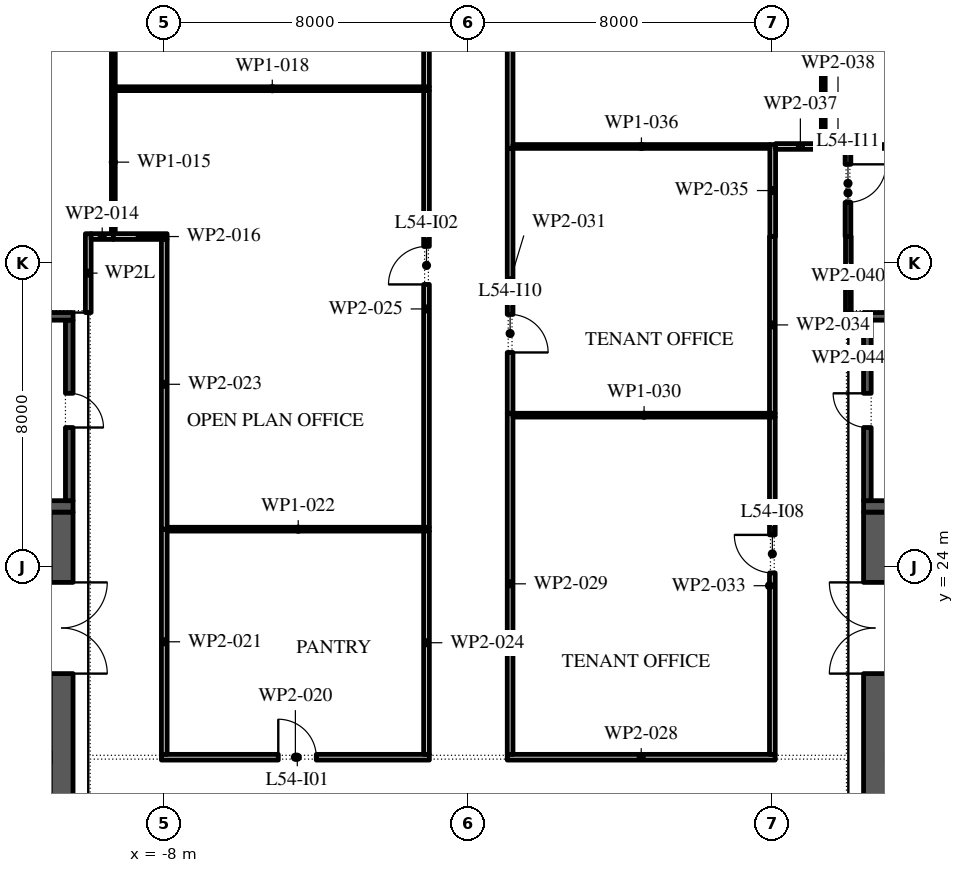
"""IFC4 building model, lengths in metres.
Left out: names, types, materials, properties, quantities, classifications, styles, units other than length and angle.
Written with IfcOpenShell. Run it as: python <this file> out.ifc"""

import sys

from ifc_helpers import new_model, si_unit, direction, frame, frame_2d, origin, place, context, subcontext, project, spatial, rectangle, extrude, element, fill, save


model = new_model("IFC4")
c1 = context("Model", 3, precision=1e-05, world=origin(), true_north=direction((0.0, 1.0)))
c2 = subcontext(c1, "Body", "Model", "MODEL_VIEW")
j1 = project(units=[si_unit("LENGTHUNIT", "METRE"), si_unit("PLANEANGLEUNIT", "RADIAN")], contexts=[c1])
p1 = place(None, origin())
s1 = spatial("IfcSite", under=j1, at=p1, CompositionType="ELEMENT")
p2 = place(p1, origin())
s2 = spatial("IfcBuilding", under=s1, at=p2, CompositionType="ELEMENT")
p3 = place(p2, frame((0.0, 0.0, 251.4)))
s3 = spatial("IfcBuildingStorey", under=s2, at=p3, CompositionType="ELEMENT", Elevation=251.4)
p4 = place(p3, frame((-10.7, -2.45, 0.0), z_axis=(0.0, 0.0, 1.0), x_axis=(0.0, 1.0, 0.0)))
e1 = element("IfcWall", 1, at=p4, inside=s3, PredefinedType="SHEAR", context=c2, shape_type="SweptSolid", body=[
    extrude(rectangle(XDim=27.9, YDim=0.6, at=frame_2d((13.95, 0.0))), origin(), (0.0, 0.0, 1.0), 4.0),
])
p5 = place(p4, frame((23.65, 0.0, 0.0)))
e2 = element("IfcOpeningElement", 2, at=p5, cuts=e1, PredefinedType="OPENING", context=c2, shape_type="SweptSolid", body=[
    extrude(rectangle(XDim=2.4, YDim=2.1, at=frame_2d((1.2, 1.05))), frame((0.0, 0.31, 0.0), z_axis=(0.0, -1.0, 0.0), x_axis=(1.0, 0.0, 0.0)), (0.0, 0.0, 1.0), 0.62),
])
p6 = place(p4, frame((1.387, 0.0, 0.0)))
e3 = element("IfcOpeningElement", 3, at=p6, cuts=e1, PredefinedType="OPENING", context=c2, shape_type="SweptSolid", body=[
    extrude(rectangle(XDim=0.9, YDim=2.1, at=frame_2d((0.45, 1.05))), frame((0.0, 0.31, 0.0), z_axis=(0.0, -1.0, 0.0), x_axis=(1.0, 0.0, 0.0)), (0.0, 0.0, 1.0), 0.62),
])
p7 = place(p4, frame((4.562, 0.0, 0.0)))
e4 = element("IfcOpeningElement", 4, at=p7, cuts=e1, PredefinedType="OPENING", context=c2, shape_type="SweptSolid", body=[
    extrude(rectangle(XDim=1.0, YDim=2.1, at=frame_2d((0.5, 1.05))), frame((0.0, 0.31, 0.0), z_axis=(0.0, -1.0, 0.0), x_axis=(1.0, 0.0, 0.0)), (0.0, 0.0, 1.0), 0.62),
])
p8 = place(p3, frame((-21.6, 25.6, 0.0), z_axis=(0.0, 0.0, 1.0), x_axis=(1.0, 0.0, 0.0)))
e5 = element("IfcWall", 5, at=p8, inside=s3, PredefinedType="SHEAR", context=c2, shape_type="SweptSolid", body=[
    extrude(rectangle(XDim=11.2, YDim=0.3, at=frame_2d((5.6, 0.0))), origin(), (0.0, 0.0, 1.0), 4.0),
])
p9 = place(p3, frame((-10.5, 25.75, 0.0), z_axis=(0.0, 0.0, 1.0), x_axis=(0.0, 1.0, 0.0)))
e6 = element("IfcWall", 6, at=p9, inside=s3, PredefinedType="SHEAR", context=c2, shape_type="SweptSolid", body=[
    extrude(rectangle(XDim=4.75, YDim=0.2, at=frame_2d((2.375, 0.0))), origin(), (0.0, 0.0, 1.0), 4.0),
])
p10 = place(p9, frame((1.925, 0.0, 0.0)))
e7 = element("IfcOpeningElement", 7, at=p10, cuts=e6, PredefinedType="OPENING", context=c2, shape_type="SweptSolid", body=[
    extrude(rectangle(XDim=0.9, YDim=2.1, at=frame_2d((0.45, 1.05))), frame((0.0, 0.11, 0.0), z_axis=(0.0, -1.0, 0.0), x_axis=(1.0, 0.0, 0.0)), (0.0, 0.0, 1.0), 0.22),
])
p11 = place(p3, frame((-21.6, 30.6, 0.0), z_axis=(0.0, 0.0, 1.0), x_axis=(1.0, 0.0, 0.0)))
e8 = element("IfcWall", 8, at=p11, inside=s3, PredefinedType="SHEAR", context=c2, shape_type="SweptSolid", body=[
    extrude(rectangle(XDim=11.2, YDim=0.2, at=frame_2d((5.6, 0.0))), origin(), (0.0, 0.0, 1.0), 4.0),
])
p12 = place(p3, frame((10.7, -2.45, 0.0), z_axis=(0.0, 0.0, 1.0), x_axis=(0.0, 1.0, 0.0)))
e9 = element("IfcWall", 9, at=p12, inside=s3, PredefinedType="SHEAR", context=c2, shape_type="SweptSolid", body=[
    extrude(rectangle(XDim=27.9, YDim=0.6, at=frame_2d((13.95, 0.0))), origin(), (0.0, 0.0, 1.0), 4.0),
])
p13 = place(p12, frame((23.65, 0.0, 0.0)))
e10 = element("IfcOpeningElement", 10, at=p13, cuts=e9, PredefinedType="OPENING", context=c2, shape_type="SweptSolid", body=[
    extrude(rectangle(XDim=2.4, YDim=2.1, at=frame_2d((1.2, 1.05))), frame((0.0, 0.31, 0.0), z_axis=(0.0, -1.0, 0.0), x_axis=(1.0, 0.0, 0.0)), (0.0, 0.0, 1.0), 0.62),
])
p14 = place(p12, frame((0.788, 0.0, 0.0)))
e11 = element("IfcOpeningElement", 11, at=p14, cuts=e9, PredefinedType="OPENING", context=c2, shape_type="SweptSolid", body=[
    extrude(rectangle(XDim=0.9, YDim=2.1, at=frame_2d((0.45, 1.05))), frame((0.0, 0.31, 0.0), z_axis=(0.0, -1.0, 0.0), x_axis=(1.0, 0.0, 0.0)), (0.0, 0.0, 1.0), 0.62),
])
p15 = place(p12, frame((3.962, 0.0, 0.0)))
e12 = element("IfcOpeningElement", 12, at=p15, cuts=e9, PredefinedType="OPENING", context=c2, shape_type="SweptSolid", body=[
    extrude(rectangle(XDim=1.0, YDim=2.1, at=frame_2d((0.5, 1.05))), frame((0.0, 0.31, 0.0), z_axis=(0.0, -1.0, 0.0), x_axis=(1.0, 0.0, 0.0)), (0.0, 0.0, 1.0), 0.62),
])
p16 = place(p3, frame((10.4, 25.6, 0.0), z_axis=(0.0, 0.0, 1.0), x_axis=(1.0, 0.0, 0.0)))
e13 = element("IfcWall", 13, at=p16, inside=s3, PredefinedType="SHEAR", context=c2, shape_type="SweptSolid", body=[
    extrude(rectangle(XDim=11.2, YDim=0.3, at=frame_2d((5.6, 0.0))), origin(), (0.0, 0.0, 1.0), 4.0),
])
p17 = place(p3, frame((10.5, 25.75, 0.0), z_axis=(0.0, 0.0, 1.0), x_axis=(0.0, 1.0, 0.0)))
e14 = element("IfcWall", 14, at=p17, inside=s3, PredefinedType="SHEAR", context=c2, shape_type="SweptSolid", body=[
    extrude(rectangle(XDim=4.75, YDim=0.2, at=frame_2d((2.375, 0.0))), origin(), (0.0, 0.0, 1.0), 4.0),
])
p18 = place(p17, frame((1.925, 0.0, 0.0)))
e15 = element("IfcOpeningElement", 15, at=p18, cuts=e14, PredefinedType="OPENING", context=c2, shape_type="SweptSolid", body=[
    extrude(rectangle(XDim=0.9, YDim=2.1, at=frame_2d((0.45, 1.05))), frame((0.0, 0.11, 0.0), z_axis=(0.0, -1.0, 0.0), x_axis=(1.0, 0.0, 0.0)), (0.0, 0.0, 1.0), 0.22),
])
p19 = place(p3, frame((10.4, 30.6, 0.0), z_axis=(0.0, 0.0, 1.0), x_axis=(1.0, 0.0, 0.0)))
e16 = element("IfcWall", 16, at=p19, inside=s3, PredefinedType="SHEAR", context=c2, shape_type="SweptSolid", body=[
    extrude(rectangle(XDim=11.2, YDim=0.2, at=frame_2d((5.6, 0.0))), origin(), (0.0, 0.0, 1.0), 4.0),
])
p20 = place(p3, frame((-10.0, 30.7, 0.0), z_axis=(0.0, 0.0, 1.0), x_axis=(0.0, 1.0, 0.0)))
e17 = element("IfcWall", 17, at=p20, inside=s3, PredefinedType="PARTITIONING", context=c2, shape_type="SweptSolid", body=[
    extrude(rectangle(XDim=2.075, YDim=0.15, at=frame_2d((1.038, 0.0))), origin(), (0.0, 0.0, 1.0), 3.02),
])
p21 = place(p3, frame((-9.925, 32.7, 0.0), z_axis=(0.0, 0.0, 1.0), x_axis=(1.0, 0.0, 0.0)))
e18 = element("IfcWall", 18, at=p21, inside=s3, PredefinedType="PARTITIONING", context=c2, shape_type="SweptSolid", body=[
    extrude(rectangle(XDim=0.585, YDim=0.15, at=frame_2d((0.292, 0.0))), origin(), (0.0, 0.0, 1.0), 4.0),
])
p22 = place(p3, frame((-9.34, 32.775, 0.0), z_axis=(0.0, 0.0, 1.0), x_axis=(0.0, 1.0, 0.0)))
e19 = element("IfcWall", 19, at=p22, inside=s3, PredefinedType="PARTITIONING", context=c2, shape_type="SweptSolid", body=[
    extrude(rectangle(XDim=3.765, YDim=0.1, at=frame_2d((1.883, 0.0))), origin(), (0.0, 0.0, 1.0), 4.0),
])
p23 = place(p3, frame((-9.34, 32.7, 0.0), z_axis=(0.0, 0.0, 1.0), x_axis=(1.0, 0.0, 0.0)))
e20 = element("IfcWall", 20, at=p23, inside=s3, PredefinedType="PARTITIONING", context=c2, shape_type="SweptSolid", body=[
    extrude(rectangle(XDim=1.415, YDim=0.15, at=frame_2d((0.708, 0.0))), origin(), (0.0, 0.0, 1.0), 4.0),
])
p24 = place(p3, frame((-9.34, 36.54, 0.0), z_axis=(0.0, 0.0, 1.0), x_axis=(0.0, 1.0, 0.0)))
e21 = element("IfcWall", 21, at=p24, inside=s3, PredefinedType="PARTITIONING", context=c2, shape_type="SweptSolid", body=[
    extrude(rectangle(XDim=5.41, YDim=0.1, at=frame_2d((2.705, 0.0))), origin(), (0.0, 0.0, 1.0), 4.0),
])
p25 = place(p3, frame((-9.29, 36.59, 0.0), z_axis=(0.0, 0.0, 1.0), x_axis=(1.0, 0.0, 0.0)))
e22 = element("IfcWall", 22, at=p25, inside=s3, PredefinedType="PARTITIONING", context=c2, shape_type="SweptSolid", body=[
    extrude(rectangle(XDim=8.265, YDim=0.1, at=frame_2d((4.133, 0.0))), origin(), (0.0, 0.0, 1.0), 4.0),
])
p26 = place(p3, frame((-8.075, 19.0, 0.0), z_axis=(0.0, 0.0, 1.0), x_axis=(1.0, 0.0, 0.0)))
e23 = element("IfcWall", 23, at=p26, inside=s3, PredefinedType="PARTITIONING", context=c2, shape_type="SweptSolid", body=[
    extrude(rectangle(XDim=7.05, YDim=0.15, at=frame_2d((3.525, 0.0))), origin(), (0.0, 0.0, 1.0), 4.0),
])
p27 = place(p26, frame((3.075, 0.0, 0.0)))
e24 = element("IfcOpeningElement", 24, at=p27, cuts=e23, PredefinedType="OPENING", context=c2, shape_type="SweptSolid", body=[
    extrude(rectangle(XDim=1.0, YDim=2.1, at=frame_2d((0.5, 1.05))), frame((0.0, 0.085, 0.0), z_axis=(0.0, -1.0, 0.0), x_axis=(1.0, 0.0, 0.0)), (0.0, 0.0, 1.0), 0.17),
])
p28 = place(p3, frame((-8.0, 25.0, 0.0), z_axis=(0.0, 0.0, 1.0), x_axis=(0.0, -1.0, 0.0)))
e25 = element("IfcWall", 25, at=p28, inside=s3, PredefinedType="PARTITIONING", context=c2, shape_type="SweptSolid", body=[
    extrude(rectangle(XDim=5.925, YDim=0.15, at=frame_2d((2.962, 0.0))), origin(), (0.0, 0.0, 1.0), 4.0),
])
p29 = place(p3, frame((-7.925, 25.0, 0.0), z_axis=(0.0, 0.0, 1.0), x_axis=(1.0, 0.0, 0.0)))
e26 = element("IfcWall", 26, at=p29, inside=s3, PredefinedType="PARTITIONING", context=c2, shape_type="SweptSolid", body=[
    extrude(rectangle(XDim=6.9, YDim=0.1, at=frame_2d((3.45, 0.0))), origin(), (0.0, 0.0, 1.0), 4.0),
])
p30 = place(p3, frame((-8.0, 32.625, 0.0), z_axis=(0.0, 0.0, 1.0), x_axis=(0.0, -1.0, 0.0)))
e27 = element("IfcWall", 27, at=p30, inside=s3, PredefinedType="PARTITIONING", context=c2, shape_type="SweptSolid", body=[
    extrude(rectangle(XDim=7.625, YDim=0.15, at=frame_2d((3.812, 0.0))), origin(), (0.0, 0.0, 1.0), 4.0),
])
p31 = place(p3, frame((-1.1, 19.075, 0.0), z_axis=(0.0, 0.0, 1.0), x_axis=(0.0, 1.0, 0.0)))
e28 = element("IfcWall", 28, at=p31, inside=s3, PredefinedType="PARTITIONING", context=c2, shape_type="SweptSolid", body=[
    extrude(rectangle(XDim=5.875, YDim=0.15, at=frame_2d((2.938, 0.0))), origin(), (0.0, 0.0, 1.0), 4.0),
])
p32 = place(p3, frame((-1.1, 25.05, 0.0), z_axis=(0.0, 0.0, 1.0), x_axis=(0.0, 1.0, 0.0)))
e29 = element("IfcWall", 29, at=p32, inside=s3, PredefinedType="PARTITIONING", context=c2, shape_type="SweptSolid", body=[
    extrude(rectangle(XDim=11.49, YDim=0.15, at=frame_2d((5.745, 0.0))), origin(), (0.0, 0.0, 1.0), 4.0),
])
p33 = place(p32, frame((6.39, 0.0, 0.0)))
e30 = element("IfcOpeningElement", 30, at=p33, cuts=e29, PredefinedType="OPENING", context=c2, shape_type="SweptSolid", body=[
    extrude(rectangle(XDim=1.0, YDim=2.1, at=frame_2d((0.5, 1.05))), frame((0.0, 0.085, 0.0), z_axis=(0.0, -1.0, 0.0), x_axis=(1.0, 0.0, 0.0)), (0.0, 0.0, 1.0), 0.17),
])
p34 = place(p3, frame((-1.1, 36.64, 0.0), z_axis=(0.0, 0.0, 1.0), x_axis=(0.0, 1.0, 0.0)))
e31 = element("IfcWall", 31, at=p34, inside=s3, PredefinedType="PARTITIONING", context=c2, shape_type="SweptSolid", body=[
    extrude(rectangle(XDim=11.138, YDim=0.15, at=frame_2d((5.569, 0.0))), origin(), (0.0, 0.0, 1.0), 4.0),
])
p35 = place(p34, frame((6.21, 0.0, 0.0)))
e32 = element("IfcOpeningElement", 32, at=p35, cuts=e31, PredefinedType="OPENING", context=c2, shape_type="SweptSolid", body=[
    extrude(rectangle(XDim=1.0, YDim=2.1, at=frame_2d((0.5, 1.05))), frame((0.0, 0.085, 0.0), z_axis=(0.0, -1.0, 0.0), x_axis=(1.0, 0.0, 0.0)), (0.0, 0.0, 1.0), 0.17),
])
p36 = place(p3, frame((1.025, 19.0, 0.0), z_axis=(0.0, 0.0, 1.0), x_axis=(1.0, 0.0, 0.0)))
e33 = element("IfcWall", 33, at=p36, inside=s3, PredefinedType="PARTITIONING", context=c2, shape_type="SweptSolid", body=[
    extrude(rectangle(XDim=7.05, YDim=0.15, at=frame_2d((3.525, 0.0))), origin(), (0.0, 0.0, 1.0), 4.0),
])
p37 = place(p3, frame((1.1, 28.05, 0.0), z_axis=(0.0, 0.0, 1.0), x_axis=(0.0, -1.0, 0.0)))
e34 = element("IfcWall", 34, at=p37, inside=s3, PredefinedType="PARTITIONING", context=c2, shape_type="SweptSolid", body=[
    extrude(rectangle(XDim=8.975, YDim=0.15, at=frame_2d((4.488, 0.0))), origin(), (0.0, 0.0, 1.0), 4.0),
])
p38 = place(p3, frame((1.175, 28.0, 0.0), z_axis=(0.0, 0.0, 1.0), x_axis=(1.0, 0.0, 0.0)))
e35 = element("IfcWall", 35, at=p38, inside=s3, PredefinedType="PARTITIONING", context=c2, shape_type="SweptSolid", body=[
    extrude(rectangle(XDim=6.9, YDim=0.1, at=frame_2d((3.45, 0.0))), origin(), (0.0, 0.0, 1.0), 4.0),
])
p39 = place(p3, frame((1.1, 35.02, 0.0), z_axis=(0.0, 0.0, 1.0), x_axis=(0.0, -1.0, 0.0)))
e36 = element("IfcWall", 36, at=p39, inside=s3, PredefinedType="PARTITIONING", context=c2, shape_type="SweptSolid", body=[
    extrude(rectangle(XDim=6.97, YDim=0.15, at=frame_2d((3.485, 0.0))), origin(), (0.0, 0.0, 1.0), 4.0),
])
p40 = place(p39, frame((4.37, 0.0, 0.0)))
e37 = element("IfcOpeningElement", 37, at=p40, cuts=e36, PredefinedType="OPENING", context=c2, shape_type="SweptSolid", body=[
    extrude(rectangle(XDim=1.0, YDim=2.1, at=frame_2d((0.5, 1.05))), frame((0.0, 0.085, 0.0), z_axis=(0.0, -1.0, 0.0), x_axis=(1.0, 0.0, 0.0)), (0.0, 0.0, 1.0), 0.17),
])
p41 = place(p3, frame((1.1, 47.27, 0.0), z_axis=(0.0, 0.0, 1.0), x_axis=(0.0, -1.0, 0.0)))
e38 = element("IfcWall", 38, at=p41, inside=s3, PredefinedType="PARTITIONING", context=c2, shape_type="SweptSolid", body=[
    extrude(rectangle(XDim=12.25, YDim=0.15, at=frame_2d((6.125, 0.0))), origin(), (0.0, 0.0, 1.0), 4.0),
])
p42 = place(p41, frame((8.05, 0.0, 0.0)))
e39 = element("IfcOpeningElement", 39, at=p42, cuts=e38, PredefinedType="OPENING", context=c2, shape_type="SweptSolid", body=[
    extrude(rectangle(XDim=1.0, YDim=2.1, at=frame_2d((0.5, 1.05))), frame((0.0, 0.085, 0.0), z_axis=(0.0, -1.0, 0.0), x_axis=(1.0, 0.0, 0.0)), (0.0, 0.0, 1.0), 0.17),
])
p43 = place(p3, frame((8.0, 19.075, 0.0), z_axis=(0.0, 0.0, 1.0), x_axis=(0.0, 1.0, 0.0)))
e40 = element("IfcWall", 40, at=p43, inside=s3, PredefinedType="PARTITIONING", context=c2, shape_type="SweptSolid", body=[
    extrude(rectangle(XDim=8.875, YDim=0.15, at=frame_2d((4.438, 0.0))), origin(), (0.0, 0.0, 1.0), 4.0),
])
p44 = place(p43, frame((4.775, 0.0, 0.0)))
e41 = element("IfcOpeningElement", 41, at=p44, cuts=e40, PredefinedType="OPENING", context=c2, shape_type="SweptSolid", body=[
    extrude(rectangle(XDim=1.0, YDim=2.1, at=frame_2d((0.5, 1.05))), frame((0.0, 0.085, 0.0), z_axis=(0.0, -1.0, 0.0), x_axis=(1.0, 0.0, 0.0)), (0.0, 0.0, 1.0), 0.17),
])
p45 = place(p3, frame((8.0, 28.05, 0.0), z_axis=(0.0, 0.0, 1.0), x_axis=(0.0, 1.0, 0.0)))
e42 = element("IfcWall", 42, at=p45, inside=s3, PredefinedType="PARTITIONING", context=c2, shape_type="SweptSolid", body=[
    extrude(rectangle(XDim=4.65, YDim=0.15, at=frame_2d((2.325, 0.0))), origin(), (0.0, 0.0, 1.0), 4.0),
])
p46 = place(p3, frame((8.01, 32.7, 0.0), z_axis=(0.0, 0.0, 1.0), x_axis=(0.0, 1.0, 0.0)))
e43 = element("IfcWall", 43, at=p46, inside=s3, PredefinedType="PARTITIONING", context=c2, shape_type="SweptSolid", body=[
    extrude(rectangle(XDim=2.42, YDim=0.15, at=frame_2d((1.21, 0.0))), origin(), (0.0, 0.0, 1.0), 4.0),
])
p47 = place(p3, frame((7.935, 35.07, 0.0), z_axis=(0.0, 0.0, 1.0), x_axis=(-1.0, 0.0, 0.0)))
e44 = element("IfcWall", 44, at=p47, inside=s3, PredefinedType="PARTITIONING", context=c2, shape_type="SweptSolid", body=[
    extrude(rectangle(XDim=6.76, YDim=0.1, at=frame_2d((3.38, 0.0))), origin(), (0.0, 0.0, 1.0), 4.0),
])
p48 = place(p3, frame((8.085, 35.07, 0.0), z_axis=(0.0, 0.0, 1.0), x_axis=(1.0, 0.0, 0.0)))
e45 = element("IfcWall", 45, at=p48, inside=s3, PredefinedType="PARTITIONING", context=c2, shape_type="SweptSolid", body=[
    extrude(rectangle(XDim=1.305, YDim=0.15, at=frame_2d((0.652, 0.0))), origin(), (0.0, 0.0, 1.0), 4.0),
])
p49 = place(p3, frame((9.39, 35.07, 0.0), z_axis=(0.0, 0.0, 1.0), x_axis=(1.0, 0.0, 0.0)))
e46 = element("IfcWall", 46, at=p49, inside=s3, PredefinedType="PARTITIONING", context=c2, shape_type="SweptSolid", body=[
    extrude(rectangle(XDim=0.675, YDim=0.15, at=frame_2d((0.337, 0.0))), origin(), (0.0, 0.0, 1.0), 4.0),
])
p50 = place(p3, frame((9.34, 45.368, 0.0), z_axis=(0.0, 0.0, 1.0), x_axis=(0.0, -1.0, 0.0)))
e47 = element("IfcWall", 47, at=p50, inside=s3, PredefinedType="PARTITIONING", context=c2, shape_type="SweptSolid", body=[
    extrude(rectangle(XDim=10.223, YDim=0.1, at=frame_2d((5.111, 0.0))), origin(), (0.0, 0.0, 1.0), 4.0),
])
p51 = place(p50, frame((6.698, 0.0, 0.0)))
e48 = element("IfcOpeningElement", 48, at=p51, cuts=e47, PredefinedType="OPENING", context=c2, shape_type="SweptSolid", body=[
    extrude(rectangle(XDim=0.9, YDim=2.1, at=frame_2d((0.45, 1.05))), frame((0.0, 0.06, 0.0), z_axis=(0.0, -1.0, 0.0), x_axis=(1.0, 0.0, 0.0)), (0.0, 0.0, 1.0), 0.12),
])
p52 = place(p3, frame((9.99, 34.995, 0.0), z_axis=(0.0, 0.0, 1.0), x_axis=(0.0, -1.0, 0.0)))
e49 = element("IfcWall", 49, at=p52, inside=s3, PredefinedType="PARTITIONING", context=c2, shape_type="SweptSolid", body=[
    extrude(rectangle(XDim=2.295, YDim=0.15, at=frame_2d((1.147, 0.0))), origin(), (0.0, 0.0, 1.0), 4.0),
])
p53 = place(p52, frame((0.395, 0.0, 0.0)))
e50 = element("IfcOpeningElement", 50, at=p53, cuts=e49, PredefinedType="OPENING", context=c2, shape_type="SweptSolid", body=[
    extrude(rectangle(XDim=1.0, YDim=2.1, at=frame_2d((0.5, 1.05))), frame((0.0, 0.085, 0.0), z_axis=(0.0, -1.0, 0.0), x_axis=(1.0, 0.0, 0.0)), (0.0, 0.0, 1.0), 0.17),
])
p54 = place(p3, frame((10.065, 35.07, 0.0), z_axis=(0.0, 0.0, 1.0), x_axis=(1.0, 0.0, 0.0)))
e51 = element("IfcWall", 51, at=p54, inside=s3, PredefinedType="PARTITIONING", context=c2, shape_type="SweptSolid", body=[
    extrude(rectangle(XDim=6.485, YDim=0.1, at=frame_2d((3.243, 0.0))), origin(), (0.0, 0.0, 1.0), 4.0),
])
p55 = place(p3, frame((10.0, 32.7, 0.0), z_axis=(0.0, 0.0, 1.0), x_axis=(0.0, -1.0, 0.0)))
e52 = element("IfcWall", 52, at=p55, inside=s3, PredefinedType="PARTITIONING", context=c2, shape_type="SweptSolid", body=[
    extrude(rectangle(XDim=2.0, YDim=0.15, at=frame_2d((1.0, 0.0))), origin(), (0.0, 0.0, 1.0), 4.0),
])
p56 = place(p5, frame((2.4, 0.0, 0.0), z_axis=(0.0, 0.0, 1.0), x_axis=(-1.0, 0.0, 0.0)))
e53 = element("IfcDoor", 53, at=p56, inside=s3, OperationType="DOUBLE_DOOR_SINGLE_SWING", PredefinedType="DOOR", context=c2, shape_type="SweptSolid", body=[
    extrude(rectangle(XDim=2.4, YDim=2.1, at=frame_2d((1.2, 1.05))), frame((0.0, 0.025, 0.0), z_axis=(0.0, -1.0, 0.0), x_axis=(1.0, 0.0, 0.0)), (0.0, 0.0, 1.0), 0.05),
])
fill(e2, e53)
p57 = place(p10, frame((0.9, 0.15, 0.0), z_axis=(0.0, 0.0, 1.0), x_axis=(-1.0, 0.0, 0.0)))
e54 = element("IfcDoor", 54, at=p57, inside=s3, OperationType="SINGLE_SWING_LEFT", PredefinedType="DOOR", context=c2, shape_type="SweptSolid", body=[
    extrude(rectangle(XDim=0.9, YDim=2.1, at=frame_2d((0.45, 1.05))), frame((0.0, 0.1, 0.0), z_axis=(0.0, -1.0, 0.0), x_axis=(1.0, 0.0, 0.0)), (0.0, 0.0, 1.0), 0.05),
])
fill(e7, e54)
p58 = place(p13, origin())
e55 = element("IfcDoor", 55, at=p58, inside=s3, OperationType="DOUBLE_DOOR_SINGLE_SWING", PredefinedType="DOOR", context=c2, shape_type="SweptSolid", body=[
    extrude(rectangle(XDim=2.4, YDim=2.1, at=frame_2d((1.2, 1.05))), frame((0.0, 0.025, 0.0), z_axis=(0.0, -1.0, 0.0), x_axis=(1.0, 0.0, 0.0)), (0.0, 0.0, 1.0), 0.05),
])
fill(e10, e55)
p59 = place(p18, origin())
e56 = element("IfcDoor", 56, at=p59, inside=s3, OperationType="SINGLE_SWING_LEFT", PredefinedType="DOOR", context=c2, shape_type="SweptSolid", body=[
    extrude(rectangle(XDim=0.9, YDim=2.1, at=frame_2d((0.45, 1.05))), frame((0.0, -0.05, 0.0), z_axis=(0.0, -1.0, 0.0), x_axis=(1.0, 0.0, 0.0)), (0.0, 0.0, 1.0), 0.05),
])
fill(e15, e56)
p60 = place(p27, origin())
e57 = element("IfcDoor", 57, at=p60, inside=s3, OperationType="SINGLE_SWING_RIGHT", PredefinedType="DOOR", context=c2, shape_type="SweptSolid", body=[
    extrude(rectangle(XDim=1.0, YDim=2.1, at=frame_2d((0.5, 1.05))), frame((0.0, 0.025, 0.0), z_axis=(0.0, -1.0, 0.0), x_axis=(1.0, 0.0, 0.0)), (0.0, 0.0, 1.0), 0.05),
])
fill(e24, e57)
p61 = place(p33, origin())
e58 = element("IfcDoor", 58, at=p61, inside=s3, OperationType="SINGLE_SWING_RIGHT", PredefinedType="DOOR", context=c2, shape_type="SweptSolid", body=[
    extrude(rectangle(XDim=1.0, YDim=2.1, at=frame_2d((0.5, 1.05))), frame((0.0, 0.025, 0.0), z_axis=(0.0, -1.0, 0.0), x_axis=(1.0, 0.0, 0.0)), (0.0, 0.0, 1.0), 0.05),
])
fill(e30, e58)
p62 = place(p44, origin())
e59 = element("IfcDoor", 59, at=p62, inside=s3, OperationType="SINGLE_SWING_LEFT", PredefinedType="DOOR", context=c2, shape_type="SweptSolid", body=[
    extrude(rectangle(XDim=1.0, YDim=2.1, at=frame_2d((0.5, 1.05))), frame((0.0, 0.025, 0.0), z_axis=(0.0, -1.0, 0.0), x_axis=(1.0, 0.0, 0.0)), (0.0, 0.0, 1.0), 0.05),
])
fill(e41, e59)
p63 = place(p40, origin())
e60 = element("IfcDoor", 60, at=p63, inside=s3, OperationType="SINGLE_SWING_LEFT", PredefinedType="DOOR", context=c2, shape_type="SweptSolid", body=[
    extrude(rectangle(XDim=1.0, YDim=2.1, at=frame_2d((0.5, 1.05))), frame((0.0, 0.025, 0.0), z_axis=(0.0, -1.0, 0.0), x_axis=(1.0, 0.0, 0.0)), (0.0, 0.0, 1.0), 0.05),
])
fill(e37, e60)
p64 = place(p53, origin())
e61 = element("IfcDoor", 61, at=p64, inside=s3, OperationType="SINGLE_SWING_RIGHT", PredefinedType="DOOR", context=c2, shape_type="SweptSolid", body=[
    extrude(rectangle(XDim=1.0, YDim=2.1, at=frame_2d((0.5, 1.05))), frame((0.0, 0.025, 0.0), z_axis=(0.0, -1.0, 0.0), x_axis=(1.0, 0.0, 0.0)), (0.0, 0.0, 1.0), 0.05),
])
fill(e50, e61)
save(model, sys.argv[1])
